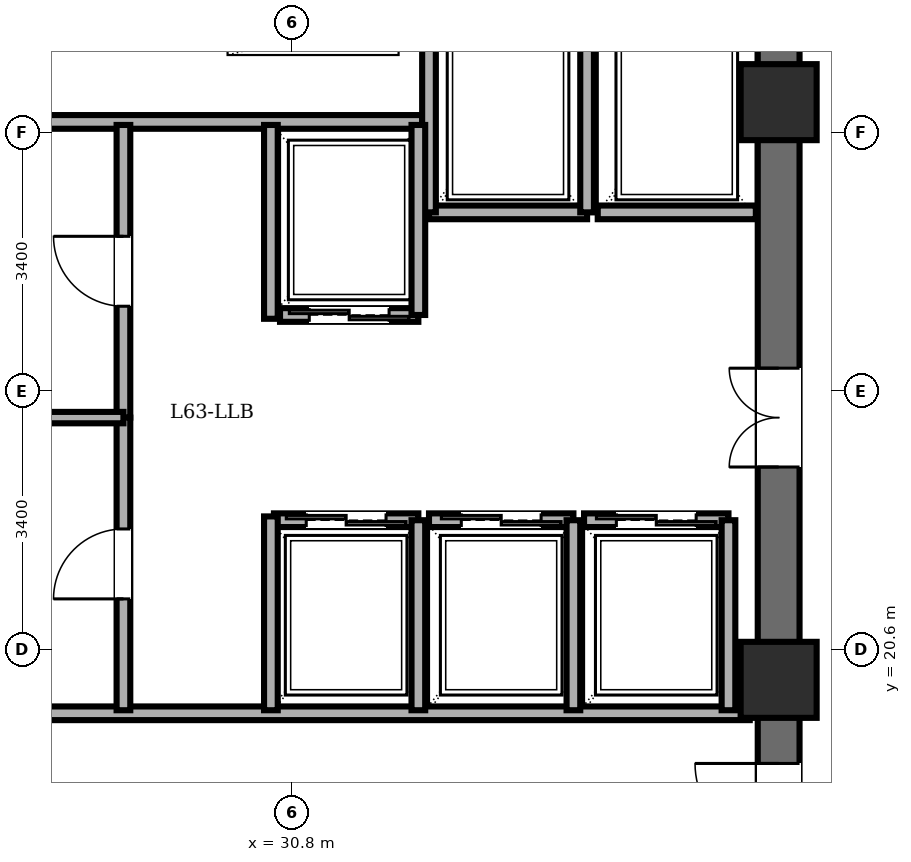
"""IFC4 building model, lengths in metres.
Left out: names, types, materials, properties, quantities, classifications, styles, units other than length and angle.
Written with IfcOpenShell. Run it as: python <this file> out.ifc"""

import sys

from ifc_helpers import new_model, si_unit, direction, frame, frame_2d, origin, origin_2d, place, context, subcontext, project, spatial, rectangle, extrude, element, fill, save


model = new_model("IFC4")
c1 = context("Model", 3, precision=1e-05, world=origin(), true_north=direction((0.0, 1.0)))
c2 = subcontext(c1, "Body", "Model", "MODEL_VIEW")
j1 = project(units=[si_unit("LENGTHUNIT", "METRE"), si_unit("PLANEANGLEUNIT", "RADIAN")], contexts=[c1])
p1 = place(None, origin())
s1 = spatial("IfcSite", under=j1, at=p1, CompositionType="ELEMENT")
p2 = place(p1, origin())
s2 = spatial("IfcBuilding", under=s1, at=p2, CompositionType="ELEMENT")
p3 = place(p2, frame((0.0, 0.0, 240.9)))
s3 = spatial("IfcBuildingStorey", under=s2, at=p3, CompositionType="ELEMENT", Elevation=240.9)
for number, where, z_axis, x_axis in (
    (1, (37.2, 20.2, 0.0), (0.0, 0.0, 1.0), (1.0, 0.0, 0.0)),
    (2, (37.2, 27.8, 0.0), (0.0, 0.0, 1.0), (1.0, 0.0, 0.0)),
):
    element("IfcColumn", number, at=place(p3, frame(where, z_axis=z_axis, x_axis=x_axis)), inside=s3, PredefinedType="COLUMN", context=c2, shape_type="SweptSolid", body=[
        extrude(rectangle(XDim=1.0, YDim=1.0, at=origin_2d()), origin(), (0.0, 0.0, 1.0), 3.6),
    ])
p4 = place(p3, frame((37.2, 14.4, 0.0), z_axis=(0.0, 0.0, 1.0), x_axis=(0.0, 1.0, 0.0)))
e3 = element("IfcWall", 3, at=p4, inside=s3, PredefinedType="SHEAR", context=c2, shape_type="SweptSolid", body=[
    extrude(rectangle(XDim=19.2, YDim=0.55, at=frame_2d((9.6, 0.0))), origin(), (0.0, 0.0, 1.0), 3.4),
])
p5 = place(p4, frame((15.8, 0.0, 0.0)))
e4 = element("IfcOpeningElement", 4, at=p5, cuts=e3, PredefinedType="OPENING", context=c2, shape_type="SweptSolid", body=[
    extrude(rectangle(XDim=1.15, YDim=2.15, at=frame_2d((0.575, 1.075))), frame((0.0, 0.285, 0.0), z_axis=(0.0, -1.0, 0.0), x_axis=(1.0, 0.0, 0.0)), (0.0, 0.0, 1.0), 0.57),
])
p6 = place(p4, frame((3.6, 0.0, 0.0)))
e5 = element("IfcOpeningElement", 5, at=p6, cuts=e3, PredefinedType="OPENING", context=c2, shape_type="SweptSolid", body=[
    extrude(rectangle(XDim=1.1, YDim=2.15, at=frame_2d((0.55, 1.075))), frame((0.0, 0.285, 0.0), z_axis=(0.0, -1.0, 0.0), x_axis=(1.0, 0.0, 0.0)), (0.0, 0.0, 1.0), 0.57),
])
p7 = place(p4, frame((8.6, 0.0, 0.0)))
e6 = element("IfcOpeningElement", 6, at=p7, cuts=e3, PredefinedType="OPENING", context=c2, shape_type="SweptSolid", body=[
    extrude(rectangle(XDim=1.3, YDim=2.2, at=frame_2d((0.65, 1.1))), frame((0.0, 0.285, 0.0), z_axis=(0.0, -1.0, 0.0), x_axis=(1.0, 0.0, 0.0)), (0.0, 0.0, 1.0), 0.57),
])
p8 = place(p3, frame((21.95, 27.54, 0.0), z_axis=(0.0, 0.0, 1.0), x_axis=(1.0, 0.0, 0.0)))
e7 = element("IfcWall", 7, at=p8, inside=s3, PredefinedType="PARTITIONING", context=c2, shape_type="SweptSolid", body=[
    extrude(rectangle(XDim=10.56, YDim=0.18, at=frame_2d((5.28, 0.0))), origin(), (0.0, 0.0, 1.0), 3.4),
])
p9 = place(p3, frame((21.95, 19.76, 0.0), z_axis=(0.0, 0.0, 1.0), x_axis=(1.0, 0.0, 0.0)))
e8 = element("IfcWall", 8, at=p9, inside=s3, PredefinedType="PARTITIONING", context=c2, shape_type="SweptSolid", body=[
    extrude(rectangle(XDim=14.87, YDim=0.18, at=frame_2d((7.435, 0.0))), origin(), (0.0, 0.0, 1.0), 3.4),
])
p10 = place(p3, frame((34.68, 26.35, 0.0), z_axis=(0.0, 0.0, 1.0), x_axis=(-1.0, 0.0, 0.0)))
e9 = element("IfcWall", 9, at=p10, inside=s3, PredefinedType="PARTITIONING", context=c2, shape_type="SweptSolid", body=[
    extrude(rectangle(XDim=2.08, YDim=0.18, at=frame_2d((1.04, 0.0))), origin(), (0.0, 0.0, 1.0), 3.4),
])
for number, where, z_axis, x_axis in (
    (10, (34.68, 26.35, 0.0), (0.0, 0.0, 1.0), (0.0, 1.0, 0.0)),
    (11, (32.6, 29.08, 0.0), (0.0, 0.0, 1.0), (0.0, -1.0, 0.0)),
):
    element("IfcWall", number, at=place(p3, frame(where, z_axis=z_axis, x_axis=x_axis)), inside=s3, PredefinedType="PARTITIONING", context=c2, shape_type="SweptSolid", body=[
        extrude(rectangle(XDim=2.73, YDim=0.18, at=frame_2d((1.365, 0.0))), origin(), (0.0, 0.0, 1.0), 3.4),
    ])
p11 = place(p3, frame((36.9, 26.35, 0.0), z_axis=(0.0, 0.0, 1.0), x_axis=(-1.0, 0.0, 0.0)))
e12 = element("IfcWall", 12, at=p11, inside=s3, PredefinedType="PARTITIONING", context=c2, shape_type="SweptSolid", body=[
    extrude(rectangle(XDim=2.08, YDim=0.18, at=frame_2d((1.04, 0.0))), origin(), (0.0, 0.0, 1.0), 3.4),
])
p12 = place(p3, frame((32.46, 25.0, 0.0), z_axis=(0.0, 0.0, 1.0), x_axis=(-1.0, 0.0, 0.0)))
e13 = element("IfcWall", 13, at=p12, inside=s3, PredefinedType="PARTITIONING", context=c2, shape_type="SweptSolid", body=[
    extrude(rectangle(XDim=1.82, YDim=0.18, at=frame_2d((0.91, 0.0))), origin(), (0.0, 0.0, 1.0), 3.4),
])
p13 = place(p12, frame((0.385, 0.0, 0.0)))
e14 = element("IfcOpeningElement", 14, at=p13, cuts=e13, PredefinedType="OPENING", context=c2, shape_type="SweptSolid", body=[
    extrude(rectangle(XDim=1.05, YDim=2.2, at=frame_2d((0.525, 1.1))), frame((0.0, 0.1, 0.0), z_axis=(0.0, -1.0, 0.0), x_axis=(1.0, 0.0, 0.0)), (0.0, 0.0, 1.0), 0.2),
])
p14 = place(p3, frame((32.46, 25.0, 0.0), z_axis=(0.0, 0.0, 1.0), x_axis=(0.0, 1.0, 0.0)))
e15 = element("IfcWall", 15, at=p14, inside=s3, PredefinedType="PARTITIONING", context=c2, shape_type="SweptSolid", body=[
    extrude(rectangle(XDim=2.5, YDim=0.18, at=frame_2d((1.25, 0.0))), origin(), (0.0, 0.0, 1.0), 3.4),
])
p15 = place(p3, frame((30.56, 22.3, 0.0), z_axis=(0.0, 0.0, 1.0), x_axis=(1.0, 0.0, 0.0)))
e16 = element("IfcWall", 16, at=p15, inside=s3, PredefinedType="PARTITIONING", context=c2, shape_type="SweptSolid", body=[
    extrude(rectangle(XDim=1.9, YDim=0.18, at=frame_2d((0.95, 0.0))), origin(), (0.0, 0.0, 1.0), 3.4),
])
p16 = place(p15, frame((0.425, 0.0, 0.0)))
e17 = element("IfcOpeningElement", 17, at=p16, cuts=e16, PredefinedType="OPENING", context=c2, shape_type="SweptSolid", body=[
    extrude(rectangle(XDim=1.05, YDim=2.2, at=frame_2d((0.525, 1.1))), frame((0.0, 0.1, 0.0), z_axis=(0.0, -1.0, 0.0), x_axis=(1.0, 0.0, 0.0)), (0.0, 0.0, 1.0), 0.2),
])
p17 = place(p3, frame((32.46, 19.8, 0.0), z_axis=(0.0, 0.0, 1.0), x_axis=(0.0, 1.0, 0.0)))
e18 = element("IfcWall", 18, at=p17, inside=s3, PredefinedType="PARTITIONING", context=c2, shape_type="SweptSolid", body=[
    extrude(rectangle(XDim=2.5, YDim=0.18, at=frame_2d((1.25, 0.0))), origin(), (0.0, 0.0, 1.0), 3.4),
])
p18 = place(p3, frame((32.6, 22.3, 0.0), z_axis=(0.0, 0.0, 1.0), x_axis=(1.0, 0.0, 0.0)))
e19 = element("IfcWall", 19, at=p18, inside=s3, PredefinedType="PARTITIONING", context=c2, shape_type="SweptSolid", body=[
    extrude(rectangle(XDim=1.9, YDim=0.18, at=frame_2d((0.95, 0.0))), origin(), (0.0, 0.0, 1.0), 3.4),
])
p19 = place(p18, frame((0.425, 0.0, 0.0)))
e20 = element("IfcOpeningElement", 20, at=p19, cuts=e19, PredefinedType="OPENING", context=c2, shape_type="SweptSolid", body=[
    extrude(rectangle(XDim=1.05, YDim=2.2, at=frame_2d((0.525, 1.1))), frame((0.0, 0.1, 0.0), z_axis=(0.0, -1.0, 0.0), x_axis=(1.0, 0.0, 0.0)), (0.0, 0.0, 1.0), 0.2),
])
p20 = place(p3, frame((34.5, 19.8, 0.0), z_axis=(0.0, 0.0, 1.0), x_axis=(0.0, 1.0, 0.0)))
e21 = element("IfcWall", 21, at=p20, inside=s3, PredefinedType="PARTITIONING", context=c2, shape_type="SweptSolid", body=[
    extrude(rectangle(XDim=2.5, YDim=0.18, at=frame_2d((1.25, 0.0))), origin(), (0.0, 0.0, 1.0), 3.4),
])
p21 = place(p3, frame((34.64, 22.3, 0.0), z_axis=(0.0, 0.0, 1.0), x_axis=(1.0, 0.0, 0.0)))
e22 = element("IfcWall", 22, at=p21, inside=s3, PredefinedType="PARTITIONING", context=c2, shape_type="SweptSolid", body=[
    extrude(rectangle(XDim=1.9, YDim=0.18, at=frame_2d((0.95, 0.0))), origin(), (0.0, 0.0, 1.0), 3.4),
])
p22 = place(p21, frame((0.425, 0.0, 0.0)))
e23 = element("IfcOpeningElement", 23, at=p22, cuts=e22, PredefinedType="OPENING", context=c2, shape_type="SweptSolid", body=[
    extrude(rectangle(XDim=1.05, YDim=2.2, at=frame_2d((0.525, 1.1))), frame((0.0, 0.1, 0.0), z_axis=(0.0, -1.0, 0.0), x_axis=(1.0, 0.0, 0.0)), (0.0, 0.0, 1.0), 0.2),
])
p23 = place(p3, frame((36.54, 19.8, 0.0), z_axis=(0.0, 0.0, 1.0), x_axis=(0.0, 1.0, 0.0)))
e24 = element("IfcWall", 24, at=p23, inside=s3, PredefinedType="PARTITIONING", context=c2, shape_type="SweptSolid", body=[
    extrude(rectangle(XDim=2.5, YDim=0.18, at=frame_2d((1.25, 0.0))), origin(), (0.0, 0.0, 1.0), 3.4),
])
for number, where, z_axis, x_axis in (
    (25, (30.52, 24.95, 0.0), (0.0, 0.0, 1.0), (0.0, 1.0, 0.0)),
    (26, (30.52, 19.8, 0.0), (0.0, 0.0, 1.0), (0.0, 1.0, 0.0)),
):
    element("IfcWall", number, at=place(p3, frame(where, z_axis=z_axis, x_axis=x_axis)), inside=s3, PredefinedType="PARTITIONING", context=c2, shape_type="SweptSolid", body=[
        extrude(rectangle(XDim=2.55, YDim=0.18, at=frame_2d((1.275, 0.0))), origin(), (0.0, 0.0, 1.0), 3.4),
    ])
p24 = place(p3, frame((28.58, 23.65, 0.0), z_axis=(0.0, 0.0, 1.0), x_axis=(0.0, 1.0, 0.0)))
e27 = element("IfcWall", 27, at=p24, inside=s3, PredefinedType="PARTITIONING", context=c2, shape_type="SweptSolid", body=[
    extrude(rectangle(XDim=3.85, YDim=0.18, at=frame_2d((1.925, 0.0))), origin(), (0.0, 0.0, 1.0), 3.4),
])
p25 = place(p24, frame((1.465, 0.0, 0.0)))
e28 = element("IfcOpeningElement", 28, at=p25, cuts=e27, PredefinedType="OPENING", context=c2, shape_type="SweptSolid", body=[
    extrude(rectangle(XDim=0.92, YDim=2.1, at=frame_2d((0.46, 1.05))), frame((0.0, 0.1, 0.0), z_axis=(0.0, -1.0, 0.0), x_axis=(1.0, 0.0, 0.0)), (0.0, 0.0, 1.0), 0.2),
])
p26 = place(p3, frame((28.58, 19.8, 0.0), z_axis=(0.0, 0.0, 1.0), x_axis=(0.0, 1.0, 0.0)))
e29 = element("IfcWall", 29, at=p26, inside=s3, PredefinedType="PARTITIONING", context=c2, shape_type="SweptSolid", body=[
    extrude(rectangle(XDim=3.85, YDim=0.18, at=frame_2d((1.925, 0.0))), origin(), (0.0, 0.0, 1.0), 3.4),
])
p27 = place(p26, frame((1.465, 0.0, 0.0)))
e30 = element("IfcOpeningElement", 30, at=p27, cuts=e29, PredefinedType="OPENING", context=c2, shape_type="SweptSolid", body=[
    extrude(rectangle(XDim=0.92, YDim=2.1, at=frame_2d((0.46, 1.05))), frame((0.0, 0.1, 0.0), z_axis=(0.0, -1.0, 0.0), x_axis=(1.0, 0.0, 0.0)), (0.0, 0.0, 1.0), 0.2),
])
p28 = place(p3, frame((21.95, 23.65, 0.0), z_axis=(0.0, 0.0, 1.0), x_axis=(1.0, 0.0, 0.0)))
e31 = element("IfcWall", 31, at=p28, inside=s3, PredefinedType="PARTITIONING", context=c2, shape_type="SweptSolid", body=[
    extrude(rectangle(XDim=6.63, YDim=0.15, at=frame_2d((3.315, 0.0))), origin(), (0.0, 0.0, 1.0), 3.4),
])
p29 = place(p6, origin())
e32 = element("IfcDoor", 32, at=p29, inside=s3, OperationType="SINGLE_SWING_RIGHT", PredefinedType="DOOR", context=c2, shape_type="SweptSolid", body=[
    extrude(rectangle(XDim=1.1, YDim=2.15, at=frame_2d((0.55, 1.075))), frame((0.0, 0.025, 0.0), z_axis=(0.0, -1.0, 0.0), x_axis=(1.0, 0.0, 0.0)), (0.0, 0.0, 1.0), 0.05),
])
fill(e5, e32)
p30 = place(p13, origin())
e33 = element("IfcDoor", 33, at=p30, inside=s3, OperationType="DOUBLE_DOOR_SLIDING", PredefinedType="DOOR", context=c2, shape_type="SweptSolid", body=[
    extrude(rectangle(XDim=1.05, YDim=2.2, at=frame_2d((0.525, 1.1))), frame((0.0, 0.025, 0.0), z_axis=(0.0, -1.0, 0.0), x_axis=(1.0, 0.0, 0.0)), (0.0, 0.0, 1.0), 0.05),
])
fill(e14, e33)
p31 = place(p16, origin())
e34 = element("IfcDoor", 34, at=p31, inside=s3, OperationType="DOUBLE_DOOR_SLIDING", PredefinedType="DOOR", context=c2, shape_type="SweptSolid", body=[
    extrude(rectangle(XDim=1.05, YDim=2.2, at=frame_2d((0.525, 1.1))), frame((0.0, 0.025, 0.0), z_axis=(0.0, -1.0, 0.0), x_axis=(1.0, 0.0, 0.0)), (0.0, 0.0, 1.0), 0.05),
])
fill(e17, e34)
p32 = place(p19, origin())
e35 = element("IfcDoor", 35, at=p32, inside=s3, OperationType="DOUBLE_DOOR_SLIDING", PredefinedType="DOOR", context=c2, shape_type="SweptSolid", body=[
    extrude(rectangle(XDim=1.05, YDim=2.2, at=frame_2d((0.525, 1.1))), frame((0.0, 0.025, 0.0), z_axis=(0.0, -1.0, 0.0), x_axis=(1.0, 0.0, 0.0)), (0.0, 0.0, 1.0), 0.05),
])
fill(e20, e35)
p33 = place(p22, origin())
e36 = element("IfcDoor", 36, at=p33, inside=s3, OperationType="DOUBLE_DOOR_SLIDING", PredefinedType="DOOR", context=c2, shape_type="SweptSolid", body=[
    extrude(rectangle(XDim=1.05, YDim=2.2, at=frame_2d((0.525, 1.1))), frame((0.0, 0.025, 0.0), z_axis=(0.0, -1.0, 0.0), x_axis=(1.0, 0.0, 0.0)), (0.0, 0.0, 1.0), 0.05),
])
fill(e23, e36)
p34 = place(p25, origin())
e37 = element("IfcDoor", 37, at=p34, inside=s3, OperationType="SINGLE_SWING_RIGHT", PredefinedType="DOOR", context=c2, shape_type="SweptSolid", body=[
    extrude(rectangle(XDim=0.92, YDim=2.1, at=frame_2d((0.46, 1.05))), frame((0.0, 0.025, 0.0), z_axis=(0.0, -1.0, 0.0), x_axis=(1.0, 0.0, 0.0)), (0.0, 0.0, 1.0), 0.05),
])
fill(e28, e37)
p35 = place(p27, origin())
e38 = element("IfcDoor", 38, at=p35, inside=s3, OperationType="SINGLE_SWING_LEFT", PredefinedType="DOOR", context=c2, shape_type="SweptSolid", body=[
    extrude(rectangle(XDim=0.92, YDim=2.1, at=frame_2d((0.46, 1.05))), frame((0.0, 0.025, 0.0), z_axis=(0.0, -1.0, 0.0), x_axis=(1.0, 0.0, 0.0)), (0.0, 0.0, 1.0), 0.05),
])
fill(e30, e38)
p36 = place(p7, origin())
e39 = element("IfcDoor", 39, at=p36, inside=s3, OperationType="DOUBLE_DOOR_SINGLE_SWING", PredefinedType="DOOR", context=c2, shape_type="SweptSolid", body=[
    extrude(rectangle(XDim=1.3, YDim=2.2, at=frame_2d((0.65, 1.1))), frame((0.0, 0.025, 0.0), z_axis=(0.0, -1.0, 0.0), x_axis=(1.0, 0.0, 0.0)), (0.0, 0.0, 1.0), 0.05),
])
fill(e6, e39)
save(model, sys.argv[1])
